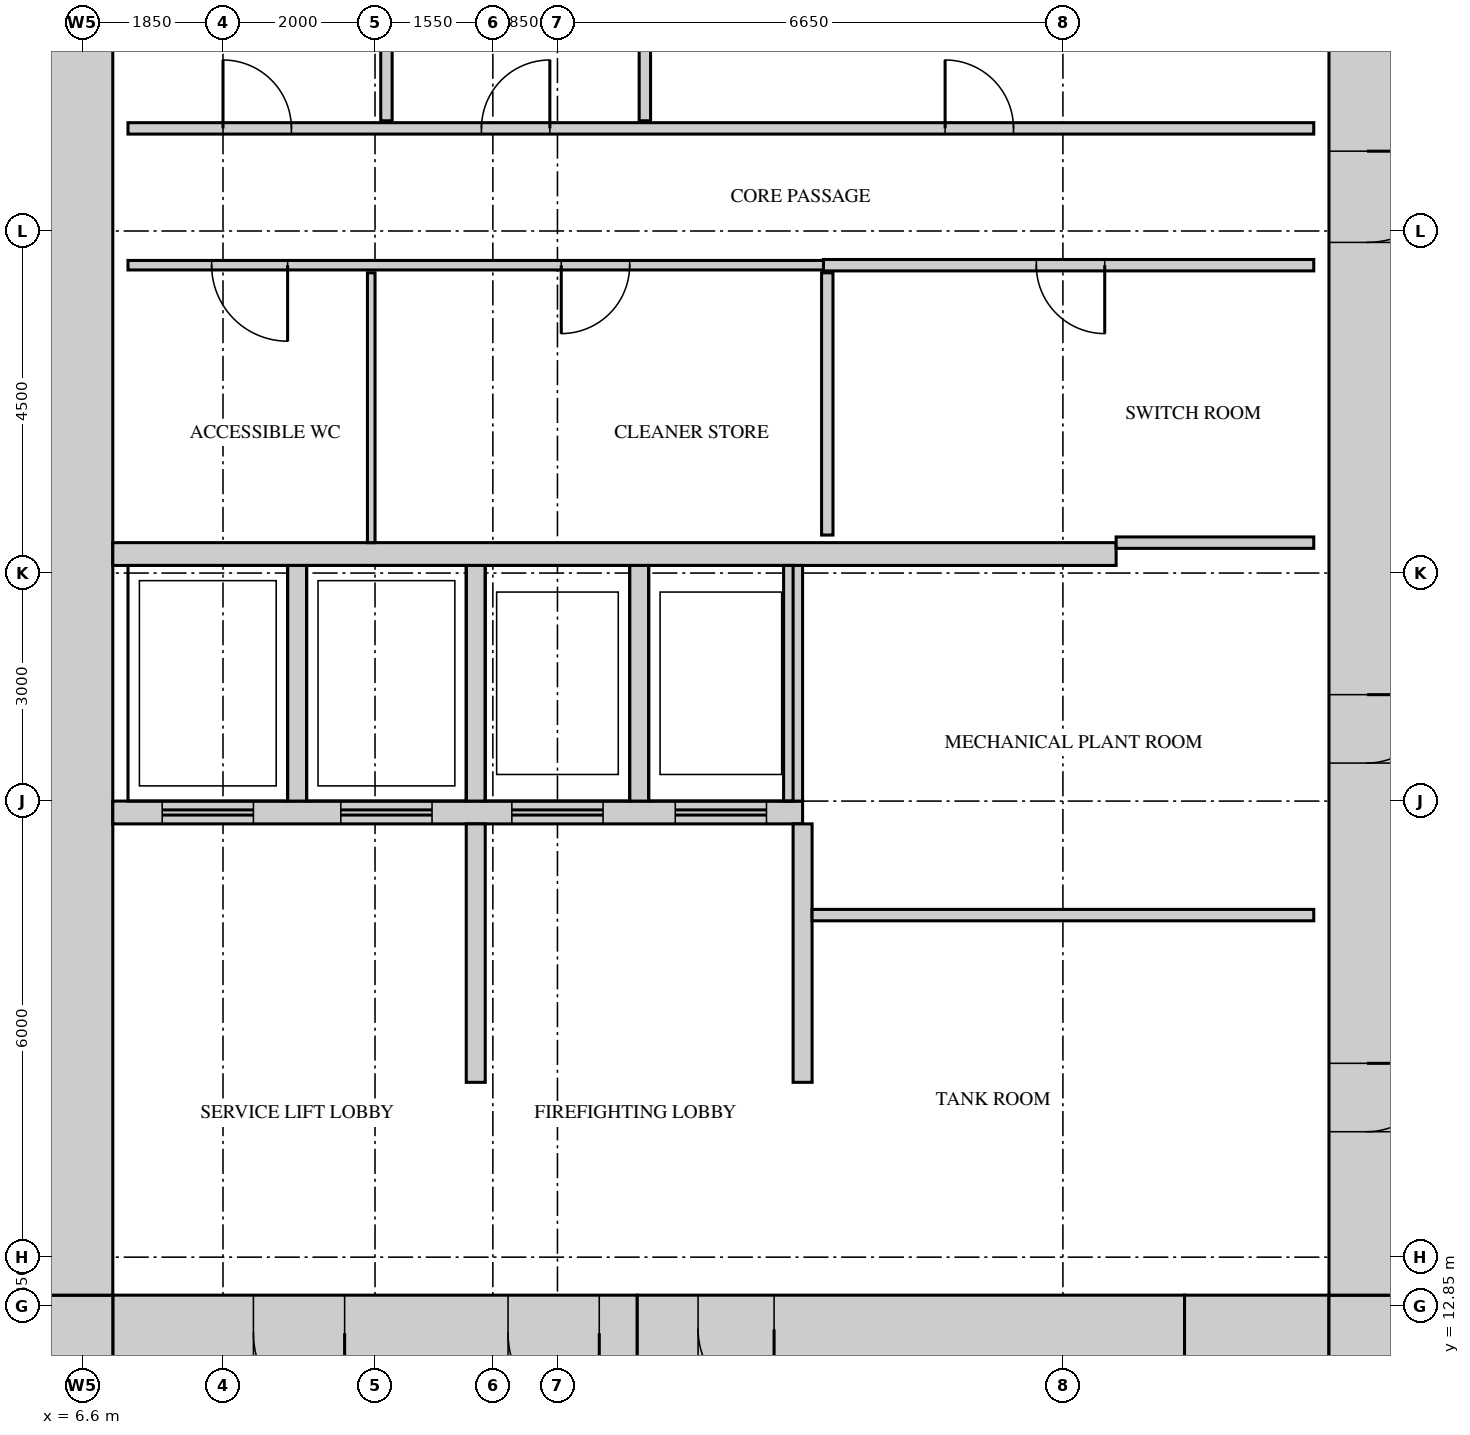
"""IFC4 building model, lengths in metres.
Left out: names, types, materials, properties, quantities, classifications, styles, units other than length and angle.
Written with IfcOpenShell. Run it as: python <this file> out.ifc"""

import sys

from ifc_helpers import new_model, si_unit, direction, frame, frame_2d, origin, place, context, subcontext, project, spatial, rectangle, extrude, source, transform, mapped, element, fill, save


model = new_model("IFC4")
c1 = context("Model", 3, precision=1e-05, world=origin(), true_north=direction((0.0, 1.0)))
c2 = subcontext(c1, "Body", "Model", "MODEL_VIEW")
j1 = project(units=[si_unit("LENGTHUNIT", "METRE"), si_unit("PLANEANGLEUNIT", "RADIAN")], contexts=[c1])
p1 = place(None, origin())
s1 = spatial("IfcSite", under=j1, at=p1, CompositionType="ELEMENT")
p2 = place(p1, origin())
s2 = spatial("IfcBuilding", under=s1, at=p2, CompositionType="ELEMENT")
p3 = place(p2, frame((0.0, 0.0, 119.1)))
s3 = spatial("IfcBuildingStorey", under=s2, at=p3, CompositionType="ELEMENT", Elevation=119.1)
m1 = source(origin(), c2, "Body", "SweptSolid", [
    extrude(rectangle(XDim=6.9, YDim=1.0, at=frame_2d((3.45, 0.0))), origin(), (0.0, 0.0, 1.0), 4.1),
])
p4 = place(p3, frame((7.0, 12.5, 0.0), z_axis=(0.0, 0.0, 1.0), x_axis=(1.0, 0.0, 0.0)))
e1 = element("IfcWall", 1, at=p4, inside=s3, PredefinedType="SHEAR", context=c2, shape_type="MappedRepresentation", body=[
    mapped(m1, transform((0.0, 0.0, 0.0))),
])
m2 = source(origin(), c2, "Body", "SweptSolid", [
    extrude(rectangle(XDim=1.2, YDim=2.1, at=frame_2d((0.6, 1.05))), frame((0.0, 0.51, 0.0), z_axis=(0.0, -1.0, 0.0), x_axis=(1.0, 0.0, 0.0)), (0.0, 0.0, 1.0), 1.02),
])
p5 = place(p4, frame((5.2, 0.0, 0.0)))
e2 = element("IfcOpeningElement", 2, at=p5, cuts=e1, PredefinedType="OPENING", context=c2, shape_type="MappedRepresentation", body=[
    mapped(m2, transform((0.0, 0.0, 0.0))),
])
p6 = place(p4, frame((1.85, 0.0, 0.0)))
e3 = element("IfcOpeningElement", 3, at=p6, cuts=e1, PredefinedType="OPENING", context=c2, shape_type="MappedRepresentation", body=[
    mapped(m2, transform((0.0, 0.0, 0.0))),
])
m3 = source(origin(), c2, "Body", "SweptSolid", [
    extrude(rectangle(XDim=7.2, YDim=0.9, at=frame_2d((3.6, 0.0))), origin(), (0.0, 0.0, 1.0), 4.1),
])
p7 = place(p3, frame((13.9, 12.55, 0.0), z_axis=(0.0, 0.0, 1.0), x_axis=(1.0, 0.0, 0.0)))
e4 = element("IfcWall", 4, at=p7, inside=s3, PredefinedType="SHEAR", context=c2, shape_type="MappedRepresentation", body=[
    mapped(m3, transform((0.0, 0.0, 0.0))),
])
m4 = source(origin(), c2, "Body", "SweptSolid", [
    extrude(rectangle(XDim=1.0, YDim=2.1, at=frame_2d((0.5, 1.05))), frame((0.0, 0.46, 0.0), z_axis=(0.0, -1.0, 0.0), x_axis=(1.0, 0.0, 0.0)), (0.0, 0.0, 1.0), 0.92),
])
p8 = place(p7, frame((0.8, 0.0, 0.0)))
e5 = element("IfcOpeningElement", 5, at=p8, cuts=e4, PredefinedType="OPENING", context=c2, shape_type="MappedRepresentation", body=[
    mapped(m4, transform((0.0, 0.0, 0.0))),
])
m5 = source(origin(), c2, "Body", "SweptSolid", [
    extrude(rectangle(XDim=1.9, YDim=1.0, at=frame_2d((0.95, 0.0))), origin(), (0.0, 0.0, 1.0), 4.1),
])
p9 = place(p3, frame((21.1, 12.5, 0.0), z_axis=(0.0, 0.0, 1.0), x_axis=(1.0, 0.0, 0.0)))
e6 = element("IfcWall", 6, at=p9, inside=s3, PredefinedType="SHEAR", context=c2, shape_type="MappedRepresentation", body=[
    mapped(m5, transform((0.0, 0.0, 0.0))),
])
m6 = source(origin(), c2, "Body", "SweptSolid", [
    extrude(rectangle(XDim=1.0, YDim=1.0, at=frame_2d((0.5, 0.0))), origin(), (0.0, 0.0, 1.0), 4.1),
])
for number, where, z_axis, x_axis in (
    (7, (23.0, 12.5, 0.0), (0.0, 0.0, 1.0), (1.0, 0.0, 0.0)),
    (8, (6.0, 12.5, 0.0), (0.0, 0.0, 1.0), (1.0, 0.0, 0.0)),
):
    element("IfcWall", number, at=place(p3, frame(where, z_axis=z_axis, x_axis=x_axis)), inside=s3, PredefinedType="SHEAR", context=c2, shape_type="MappedRepresentation", body=[
        mapped(m6, transform((0.0, 0.0, 0.0))),
    ])
m7 = source(origin(), c2, "Body", "SweptSolid", [
    extrude(rectangle(XDim=28.0, YDim=1.0, at=frame_2d((14.0, 0.0))), origin(), (0.0, 0.0, 1.0), 4.1),
])
p10 = place(p3, frame((23.5, 13.0, 0.0), z_axis=(0.0, 0.0, 1.0), x_axis=(0.0, 1.0, 0.0)))
e9 = element("IfcWall", 9, at=p10, inside=s3, PredefinedType="SHEAR", context=c2, shape_type="MappedRepresentation", body=[
    mapped(m7, transform((0.0, 0.0, 0.0))),
])
m8 = source(origin(), c2, "Body", "SweptSolid", [
    extrude(rectangle(XDim=1.8, YDim=2.1, at=frame_2d((0.9, 1.05))), frame((0.0, 0.51, 0.0), z_axis=(0.0, -1.0, 0.0), x_axis=(1.0, 0.0, 0.0)), (0.0, 0.0, 1.0), 1.02),
])
p11 = place(p10, frame((22.6, 0.0, 0.0)))
e10 = element("IfcOpeningElement", 10, at=p11, cuts=e9, PredefinedType="OPENING", context=c2, shape_type="MappedRepresentation", body=[
    mapped(m8, transform((0.0, 0.0, 0.0))),
])
p12 = place(p10, frame((13.85, 0.0, 0.0)))
e11 = element("IfcOpeningElement", 11, at=p12, cuts=e9, PredefinedType="OPENING", context=c2, shape_type="MappedRepresentation", body=[
    mapped(m2, transform((0.0, 0.0, 0.0))),
])
m9 = source(origin(), c2, "Body", "SweptSolid", [
    extrude(rectangle(XDim=0.9, YDim=2.1, at=frame_2d((0.45, 1.05))), frame((0.0, 0.51, 0.0), z_axis=(0.0, -1.0, 0.0), x_axis=(1.0, 0.0, 0.0)), (0.0, 0.0, 1.0), 1.02),
])
p13 = place(p10, frame((2.15, 0.0, 0.0)))
e12 = element("IfcOpeningElement", 12, at=p13, cuts=e9, PredefinedType="OPENING", context=c2, shape_type="MappedRepresentation", body=[
    mapped(m9, transform((0.0, 0.0, 0.0))),
])
p14 = place(p10, frame((7.0, 0.0, 0.0)))
e13 = element("IfcOpeningElement", 13, at=p14, cuts=e9, PredefinedType="OPENING", context=c2, shape_type="MappedRepresentation", body=[
    mapped(m9, transform((0.0, 0.0, 0.0))),
])
p15 = place(p3, frame((6.5, 13.0, 0.0), z_axis=(0.0, 0.0, 1.0), x_axis=(0.0, 1.0, 0.0)))
e14 = element("IfcWall", 14, at=p15, inside=s3, PredefinedType="SHEAR", context=c2, shape_type="MappedRepresentation", body=[
    mapped(m7, transform((0.0, 0.0, 0.0))),
])
m10 = source(origin(), c2, "Body", "SweptSolid", [
    extrude(rectangle(XDim=13.2, YDim=0.3, at=frame_2d((6.6, 0.0))), origin(), (0.0, 0.0, 1.0), 4.1),
])
p16 = place(p3, frame((7.0, 22.75, 0.0), z_axis=(0.0, 0.0, 1.0), x_axis=(1.0, 0.0, 0.0)))
e15 = element("IfcWall", 15, at=p16, inside=s3, PredefinedType="STANDARD", context=c2, shape_type="MappedRepresentation", body=[
    mapped(m10, transform((0.0, 0.0, 0.0))),
])
m11 = source(origin(), c2, "Body", "SweptSolid", [
    extrude(rectangle(XDim=9.075, YDim=0.3, at=frame_2d((4.538, 0.0))), origin(), (0.0, 0.0, 1.0), 4.1),
])
p17 = place(p3, frame((7.0, 19.35, 0.0), z_axis=(0.0, 0.0, 1.0), x_axis=(1.0, 0.0, 0.0)))
e16 = element("IfcWall", 16, at=p17, inside=s3, PredefinedType="STANDARD", context=c2, shape_type="MappedRepresentation", body=[
    mapped(m11, transform((0.0, 0.0, 0.0))),
])
m12 = source(origin(), c2, "Body", "SweptSolid", [
    extrude(rectangle(XDim=1.2, YDim=2.1, at=frame_2d((0.6, 1.05))), frame((0.0, 0.16, 0.0), z_axis=(0.0, -1.0, 0.0), x_axis=(1.0, 0.0, 0.0)), (0.0, 0.0, 1.0), 0.32),
])
p18 = place(p17, frame((0.65, 0.0, 0.0)))
e17 = element("IfcOpeningElement", 17, at=p18, cuts=e16, PredefinedType="OPENING", context=c2, shape_type="MappedRepresentation", body=[
    mapped(m12, transform((0.0, 0.0, 0.0))),
])
p19 = place(p17, frame((3.0, 0.0, 0.0)))
e18 = element("IfcOpeningElement", 18, at=p19, cuts=e16, PredefinedType="OPENING", context=c2, shape_type="MappedRepresentation", body=[
    mapped(m12, transform((0.0, 0.0, 0.0))),
])
p20 = place(p17, frame((5.25, 0.0, 0.0)))
e19 = element("IfcOpeningElement", 19, at=p20, cuts=e16, PredefinedType="OPENING", context=c2, shape_type="MappedRepresentation", body=[
    mapped(m12, transform((0.0, 0.0, 0.0))),
])
p21 = place(p17, frame((7.4, 0.0, 0.0)))
e20 = element("IfcOpeningElement", 20, at=p21, cuts=e16, PredefinedType="OPENING", context=c2, shape_type="MappedRepresentation", body=[
    mapped(m12, transform((0.0, 0.0, 0.0))),
])
m13 = source(origin(), c2, "Body", "SweptSolid", [
    extrude(rectangle(XDim=3.1, YDim=0.25, at=frame_2d((1.55, 0.0))), origin(), (0.0, 0.0, 1.0), 4.1),
])
for number, where, z_axis, x_axis in (
    (21, (9.425, 19.5, 0.0), (0.0, 0.0, 1.0), (0.0, 1.0, 0.0)),
    (22, (11.775, 19.5, 0.0), (0.0, 0.0, 1.0), (0.0, 1.0, 0.0)),
    (23, (13.925, 19.5, 0.0), (0.0, 0.0, 1.0), (0.0, 1.0, 0.0)),
    (24, (15.95, 19.5, 0.0), (0.0, 0.0, 1.0), (0.0, 1.0, 0.0)),
):
    element("IfcWall", number, at=place(p3, frame(where, z_axis=z_axis, x_axis=x_axis)), inside=s3, PredefinedType="STANDARD", context=c2, shape_type="MappedRepresentation", body=[
        mapped(m13, transform((0.0, 0.0, 0.0))),
    ])
m14 = source(origin(), c2, "Body", "SweptSolid", [
    extrude(rectangle(XDim=3.4, YDim=0.25, at=frame_2d((1.7, 0.0))), origin(), (0.0, 0.0, 1.0), 4.1),
])
for number, where, z_axis, x_axis in (
    (25, (16.075, 15.8, 0.0), (0.0, 0.0, 1.0), (0.0, 1.0, 0.0)),
    (26, (11.775, 15.8, 0.0), (0.0, 0.0, 1.0), (0.0, 1.0, 0.0)),
):
    element("IfcWall", number, at=place(p3, frame(where, z_axis=z_axis, x_axis=x_axis)), inside=s3, PredefinedType="STANDARD", context=c2, shape_type="MappedRepresentation", body=[
        mapped(m14, transform((0.0, 0.0, 0.0))),
    ])
m15 = source(origin(), c2, "Body", "SweptSolid", [
    extrude(rectangle(XDim=6.6, YDim=0.15, at=frame_2d((3.3, 0.0))), origin(), (0.0, 0.0, 1.0), 4.2),
])
p22 = place(p3, frame((16.2, 18.0, 0.0), z_axis=(0.0, 0.0, 1.0), x_axis=(1.0, 0.0, 0.0)))
e27 = element("IfcWall", 27, at=p22, inside=s3, PredefinedType="PARTITIONING", context=c2, shape_type="MappedRepresentation", body=[
    mapped(m15, transform((0.0, 0.0, 0.0))),
])
m16 = source(origin(), c2, "Body", "SweptSolid", [
    extrude(rectangle(XDim=3.55, YDim=0.1, at=frame_2d((1.775, 0.0))), origin(), (0.0, 0.0, 1.0), 4.2),
])
p23 = place(p3, frame((10.4, 22.9, 0.0), z_axis=(0.0, 0.0, 1.0), x_axis=(0.0, 1.0, 0.0)))
e28 = element("IfcWall", 28, at=p23, inside=s3, PredefinedType="PARTITIONING", context=c2, shape_type="MappedRepresentation", body=[
    mapped(m16, transform((0.0, 0.0, 0.0))),
])
m17 = source(origin(), c2, "Body", "SweptSolid", [
    extrude(rectangle(XDim=2.6, YDim=0.15, at=frame_2d((1.3, 0.0))), origin(), (0.0, 0.0, 1.0), 4.2),
])
p24 = place(p3, frame((20.2, 22.9, 0.0), z_axis=(0.0, 0.0, 1.0), x_axis=(1.0, 0.0, 0.0)))
e29 = element("IfcWall", 29, at=p24, inside=s3, PredefinedType="PARTITIONING", context=c2, shape_type="MappedRepresentation", body=[
    mapped(m17, transform((0.0, 0.0, 0.0))),
])
m18 = source(origin(), c2, "Body", "SweptSolid", [
    extrude(rectangle(XDim=3.45, YDim=0.15, at=frame_2d((1.725, 0.0))), origin(), (0.0, 0.0, 1.0), 4.2),
])
p25 = place(p3, frame((16.4, 23.0, 0.0), z_axis=(0.0, 0.0, 1.0), x_axis=(0.0, 1.0, 0.0)))
e30 = element("IfcWall", 30, at=p25, inside=s3, PredefinedType="PARTITIONING", context=c2, shape_type="MappedRepresentation", body=[
    mapped(m18, transform((0.0, 0.0, 0.0))),
])
m19 = source(origin(), c2, "Body", "SweptSolid", [
    extrude(rectangle(XDim=9.15, YDim=0.125, at=frame_2d((4.575, 0.0))), origin(), (0.0, 0.0, 1.0), 4.2),
])
p26 = place(p3, frame((7.2, 26.55, 0.0), z_axis=(0.0, 0.0, 1.0), x_axis=(1.0, 0.0, 0.0)))
e31 = element("IfcWall", 31, at=p26, inside=s3, PredefinedType="PARTITIONING", context=c2, shape_type="MappedRepresentation", body=[
    mapped(m19, transform((0.0, 0.0, 0.0))),
])
m20 = source(origin(), c2, "Body", "SweptSolid", [
    extrude(rectangle(XDim=1.0, YDim=2.1, at=frame_2d((0.5, 1.05))), frame((0.0, 0.073, 0.0), z_axis=(0.0, -1.0, 0.0), x_axis=(1.0, 0.0, 0.0)), (0.0, 0.0, 1.0), 0.145),
])
p27 = place(p26, frame((1.1, 0.0, 0.0)))
e32 = element("IfcOpeningElement", 32, at=p27, cuts=e31, PredefinedType="OPENING", context=c2, shape_type="MappedRepresentation", body=[
    mapped(m20, transform((0.0, 0.0, 0.0))),
])
m21 = source(origin(), c2, "Body", "SweptSolid", [
    extrude(rectangle(XDim=0.9, YDim=2.1, at=frame_2d((0.45, 1.05))), frame((0.0, 0.073, 0.0), z_axis=(0.0, -1.0, 0.0), x_axis=(1.0, 0.0, 0.0)), (0.0, 0.0, 1.0), 0.145),
])
p28 = place(p26, frame((5.7, 0.0, 0.0)))
e33 = element("IfcOpeningElement", 33, at=p28, cuts=e31, PredefinedType="OPENING", context=c2, shape_type="MappedRepresentation", body=[
    mapped(m21, transform((0.0, 0.0, 0.0))),
])
m22 = source(origin(), c2, "Body", "SweptSolid", [
    extrude(rectangle(XDim=6.45, YDim=0.15, at=frame_2d((3.225, 0.0))), origin(), (0.0, 0.0, 1.0), 4.2),
])
p29 = place(p3, frame((16.35, 26.55, 0.0), z_axis=(0.0, 0.0, 1.0), x_axis=(1.0, 0.0, 0.0)))
e34 = element("IfcWall", 34, at=p29, inside=s3, PredefinedType="PARTITIONING", context=c2, shape_type="MappedRepresentation", body=[
    mapped(m22, transform((0.0, 0.0, 0.0))),
])
m23 = source(origin(), c2, "Body", "SweptSolid", [
    extrude(rectangle(XDim=0.9, YDim=2.1, at=frame_2d((0.45, 1.05))), frame((0.0, 0.085, 0.0), z_axis=(0.0, -1.0, 0.0), x_axis=(1.0, 0.0, 0.0)), (0.0, 0.0, 1.0), 0.17),
])
p30 = place(p29, frame((2.8, 0.0, 0.0)))
e35 = element("IfcOpeningElement", 35, at=p30, cuts=e34, PredefinedType="OPENING", context=c2, shape_type="MappedRepresentation", body=[
    mapped(m23, transform((0.0, 0.0, 0.0))),
])
m24 = source(origin(), c2, "Body", "SweptSolid", [
    extrude(rectangle(XDim=15.6, YDim=0.15, at=frame_2d((7.8, 0.0))), origin(), (0.0, 0.0, 1.0), 4.2),
])
p31 = place(p3, frame((7.2, 28.35, 0.0), z_axis=(0.0, 0.0, 1.0), x_axis=(1.0, 0.0, 0.0)))
e36 = element("IfcWall", 36, at=p31, inside=s3, PredefinedType="PARTITIONING", context=c2, shape_type="MappedRepresentation", body=[
    mapped(m24, transform((0.0, 0.0, 0.0))),
])
p32 = place(p31, frame((1.25, 0.0, 0.0)))
e37 = element("IfcOpeningElement", 37, at=p32, cuts=e36, PredefinedType="OPENING", context=c2, shape_type="MappedRepresentation", body=[
    mapped(m23, transform((0.0, 0.0, 0.0))),
])
p33 = place(p31, frame((4.65, 0.0, 0.0)))
e38 = element("IfcOpeningElement", 38, at=p33, cuts=e36, PredefinedType="OPENING", context=c2, shape_type="MappedRepresentation", body=[
    mapped(m23, transform((0.0, 0.0, 0.0))),
])
p34 = place(p31, frame((10.75, 0.0, 0.0)))
e39 = element("IfcOpeningElement", 39, at=p34, cuts=e36, PredefinedType="OPENING", context=c2, shape_type="MappedRepresentation", body=[
    mapped(m23, transform((0.0, 0.0, 0.0))),
])
for number, where, z_axis, x_axis in (
    (40, (10.6, 28.45, 0.0), (0.0, 0.0, 1.0), (0.0, 1.0, 0.0)),
    (41, (14.0, 28.45, 0.0), (0.0, 0.0, 1.0), (0.0, 1.0, 0.0)),
):
    element("IfcWall", number, at=place(p3, frame(where, z_axis=z_axis, x_axis=x_axis)), inside=s3, PredefinedType="PARTITIONING", context=c2, shape_type="MappedRepresentation", body=[
        mapped(m18, transform((0.0, 0.0, 0.0))),
    ])
m25 = source(origin(), c2, "Body", "SweptSolid", [
    extrude(rectangle(XDim=1.2, YDim=2.1, at=frame_2d((0.6, 1.05))), frame((0.0, 0.45, 0.0), z_axis=(0.0, -1.0, 0.0), x_axis=(1.0, 0.0, 0.0)), (0.0, 0.0, 1.0), 0.9),
])
p35 = place(p12, origin())
e42 = element("IfcDoor", 42, at=p35, inside=s3, OperationType="SINGLE_SWING_RIGHT", PredefinedType="DOOR", context=c2, shape_type="MappedRepresentation", body=[
    mapped(m25, transform((0.0, 0.0, 0.0))),
])
fill(e11, e42)
m26 = source(origin(), c2, "Body", "SweptSolid", [
    extrude(rectangle(XDim=0.9, YDim=2.1, at=frame_2d((0.45, 1.05))), frame((0.0, 0.025, 0.0), z_axis=(0.0, -1.0, 0.0), x_axis=(1.0, 0.0, 0.0)), (0.0, 0.0, 1.0), 0.05),
])
p36 = place(p32, origin())
e43 = element("IfcDoor", 43, at=p36, inside=s3, OperationType="SINGLE_SWING_RIGHT", PredefinedType="DOOR", context=c2, shape_type="MappedRepresentation", body=[
    mapped(m26, transform((0.0, 0.0, 0.0))),
])
fill(e37, e43)
p37 = place(p33, origin())
e44 = element("IfcDoor", 44, at=p37, inside=s3, OperationType="SINGLE_SWING_LEFT", PredefinedType="DOOR", context=c2, shape_type="MappedRepresentation", body=[
    mapped(m26, transform((0.0, 0.0, 0.0))),
])
fill(e38, e44)
p38 = place(p34, origin())
e45 = element("IfcDoor", 45, at=p38, inside=s3, OperationType="SINGLE_SWING_RIGHT", PredefinedType="DOOR", context=c2, shape_type="MappedRepresentation", body=[
    mapped(m26, transform((0.0, 0.0, 0.0))),
])
fill(e39, e45)
m27 = source(origin(), c2, "Body", "SweptSolid", [
    extrude(rectangle(XDim=1.0, YDim=2.1, at=frame_2d((0.5, 1.05))), frame((0.0, 0.025, 0.0), z_axis=(0.0, -1.0, 0.0), x_axis=(1.0, 0.0, 0.0)), (0.0, 0.0, 1.0), 0.05),
])
p39 = place(p27, origin())
e46 = element("IfcDoor", 46, at=p39, inside=s3, OperationType="SINGLE_SWING_RIGHT", PredefinedType="DOOR", context=c2, shape_type="MappedRepresentation", body=[
    mapped(m27, transform((0.0, 0.0, 0.0))),
])
fill(e32, e46)
p40 = place(p28, origin())
e47 = element("IfcDoor", 47, at=p40, inside=s3, OperationType="SINGLE_SWING_LEFT", PredefinedType="DOOR", context=c2, shape_type="MappedRepresentation", body=[
    mapped(m26, transform((0.0, 0.0, 0.0))),
])
fill(e33, e47)
p41 = place(p30, origin())
e48 = element("IfcDoor", 48, at=p41, inside=s3, OperationType="SINGLE_SWING_RIGHT", PredefinedType="DOOR", context=c2, shape_type="MappedRepresentation", body=[
    mapped(m26, transform((0.0, 0.0, 0.0))),
])
fill(e35, e48)
m28 = source(origin(), c2, "Body", "SweptSolid", [
    extrude(rectangle(XDim=0.9, YDim=2.1, at=frame_2d((0.45, 1.05))), frame((0.0, 0.45, 0.0), z_axis=(0.0, -1.0, 0.0), x_axis=(1.0, 0.0, 0.0)), (0.0, 0.0, 1.0), 0.9),
])
p42 = place(p13, origin())
e49 = element("IfcDoor", 49, at=p42, inside=s3, OperationType="SINGLE_SWING_RIGHT", PredefinedType="DOOR", context=c2, shape_type="MappedRepresentation", body=[
    mapped(m28, transform((0.0, 0.0, 0.0))),
])
fill(e12, e49)
p43 = place(p14, origin())
e50 = element("IfcDoor", 50, at=p43, inside=s3, OperationType="SINGLE_SWING_RIGHT", PredefinedType="DOOR", context=c2, shape_type="MappedRepresentation", body=[
    mapped(m28, transform((0.0, 0.0, 0.0))),
])
fill(e13, e50)
p44 = place(p5, origin())
e51 = element("IfcDoor", 51, at=p44, inside=s3, OperationType="SINGLE_SWING_RIGHT", PredefinedType="DOOR", context=c2, shape_type="MappedRepresentation", body=[
    mapped(m25, transform((0.0, 0.0, 0.0))),
])
fill(e2, e51)
p45 = place(p6, origin())
e52 = element("IfcDoor", 52, at=p45, inside=s3, OperationType="SINGLE_SWING_RIGHT", PredefinedType="DOOR", context=c2, shape_type="MappedRepresentation", body=[
    mapped(m25, transform((0.0, 0.0, 0.0))),
])
fill(e3, e52)
m29 = source(origin(), c2, "Body", "SweptSolid", [
    extrude(rectangle(XDim=1.0, YDim=2.1, at=frame_2d((0.5, 1.05))), frame((0.0, 0.4, 0.0), z_axis=(0.0, -1.0, 0.0), x_axis=(1.0, 0.0, 0.0)), (0.0, 0.0, 1.0), 0.8),
])
p46 = place(p8, origin())
e53 = element("IfcDoor", 53, at=p46, inside=s3, OperationType="SINGLE_SWING_RIGHT", PredefinedType="DOOR", context=c2, shape_type="MappedRepresentation", body=[
    mapped(m29, transform((0.0, 0.0, 0.0))),
])
fill(e5, e53)
m30 = source(origin(), c2, "Body", "SweptSolid", [
    extrude(rectangle(XDim=1.2, YDim=2.1, at=frame_2d((0.6, 1.05))), frame((0.0, 0.025, 0.0), z_axis=(0.0, -1.0, 0.0), x_axis=(1.0, 0.0, 0.0)), (0.0, 0.0, 1.0), 0.05),
])
p47 = place(p18, origin())
e54 = element("IfcDoor", 54, at=p47, inside=s3, OperationType="DOUBLE_DOOR_SLIDING", PredefinedType="DOOR", context=c2, shape_type="MappedRepresentation", body=[
    mapped(m30, transform((0.0, 0.0, 0.0))),
])
fill(e17, e54)
p48 = place(p19, origin())
e55 = element("IfcDoor", 55, at=p48, inside=s3, OperationType="DOUBLE_DOOR_SLIDING", PredefinedType="DOOR", context=c2, shape_type="MappedRepresentation", body=[
    mapped(m30, transform((0.0, 0.0, 0.0))),
])
fill(e18, e55)
p49 = place(p20, origin())
e56 = element("IfcDoor", 56, at=p49, inside=s3, OperationType="DOUBLE_DOOR_SLIDING", PredefinedType="DOOR", context=c2, shape_type="MappedRepresentation", body=[
    mapped(m30, transform((0.0, 0.0, 0.0))),
])
fill(e19, e56)
p50 = place(p21, origin())
e57 = element("IfcDoor", 57, at=p50, inside=s3, OperationType="DOUBLE_DOOR_SLIDING", PredefinedType="DOOR", context=c2, shape_type="MappedRepresentation", body=[
    mapped(m30, transform((0.0, 0.0, 0.0))),
])
fill(e20, e57)
save(model, sys.argv[1])
